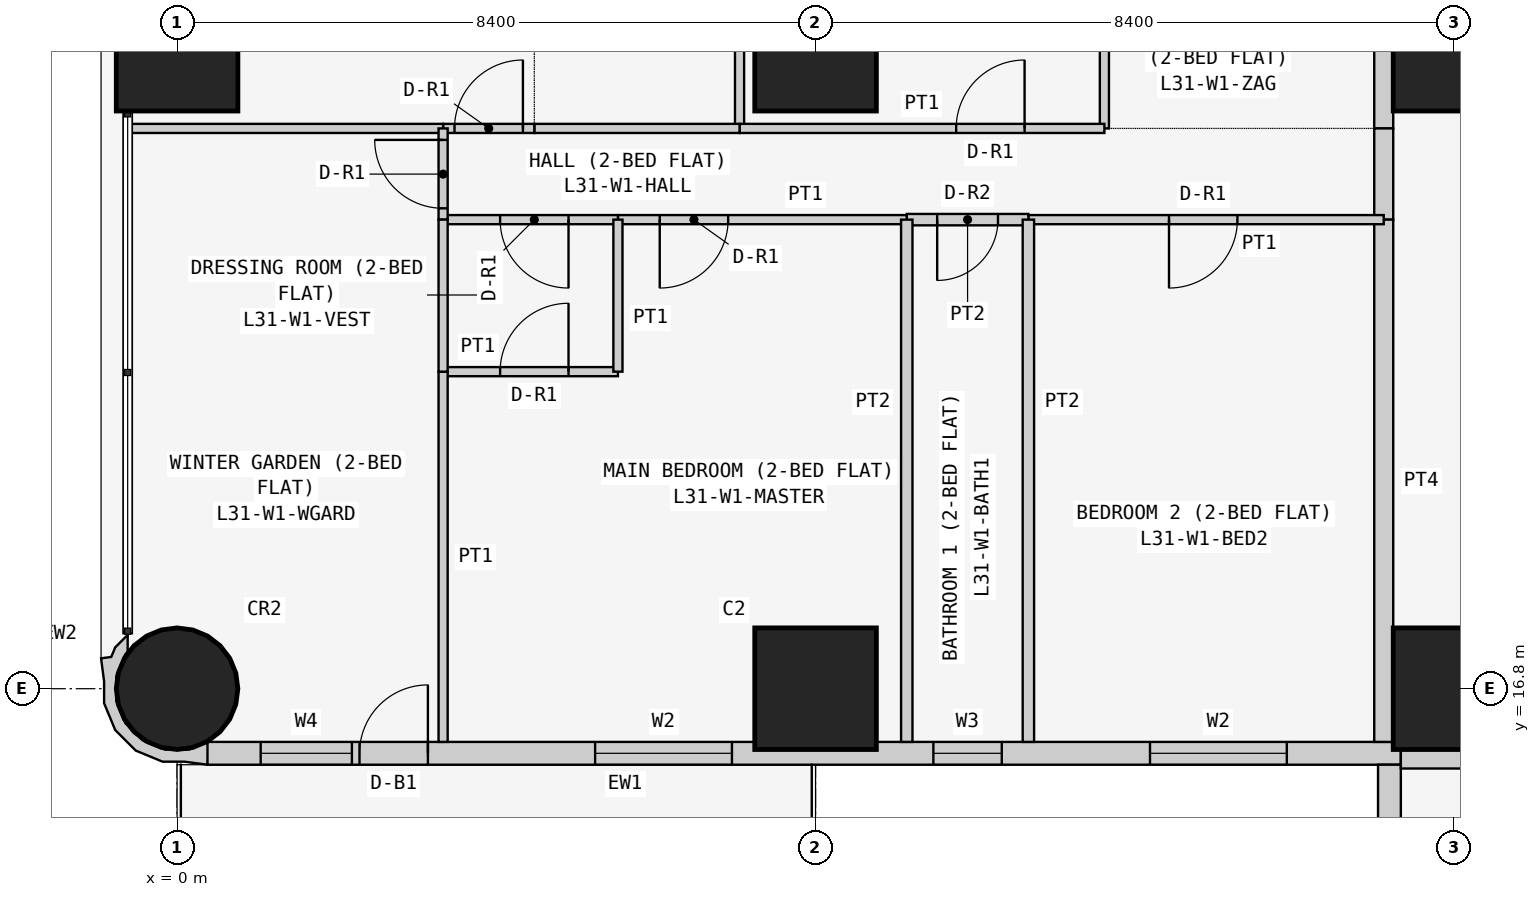
"""IFC4 building model, lengths in metres.
Left out: names, types, materials, properties, quantities, classifications, styles, units other than length and angle.
Written with IfcOpenShell. Run it as: python <this file> out.ifc"""

import sys

from ifc_helpers import new_model, si_unit, direction, frame, frame_2d, origin, origin_2d, place, context, subcontext, project, spatial, polyline, rectangle, circle, outline, extrude, element, fill, save


model = new_model("IFC4")
c1 = context("Model", 3, precision=1e-05, world=origin(), true_north=direction((0.0, 1.0)))
c2 = subcontext(c1, "Body", "Model", "MODEL_VIEW")
j1 = project(units=[si_unit("LENGTHUNIT", "METRE"), si_unit("PLANEANGLEUNIT", "RADIAN")], contexts=[c1])
p1 = place(None, origin())
s1 = spatial("IfcSite", under=j1, at=p1, CompositionType="ELEMENT")
p2 = place(p1, origin())
s2 = spatial("IfcBuilding", under=s1, at=p2, CompositionType="ELEMENT")
p3 = place(p2, frame((0.0, 0.0, 123.3)))
s3 = spatial("IfcBuildingStorey", under=s2, at=p3, CompositionType="ELEMENT", Elevation=123.3)
p4 = place(p3, frame((0.0, 16.8, 0.0), z_axis=(0.0, 0.0, 1.0), x_axis=(1.0, 0.0, 0.0)))
e1 = element("IfcColumn", 1, at=p4, inside=s3, PredefinedType="COLUMN", context=c2, shape_type="SweptSolid", body=[
    extrude(circle(Radius=0.8, at=origin_2d()), origin(), (0.0, 0.0, 1.0), 3.6),
])
for number, where, z_axis, x_axis in (
    (2, (0.0, 25.2, 0.0), (0.0, 0.0, 1.0), (1.0, 0.0, 0.0)),
    (3, (8.4, 16.8, 0.0), (0.0, 0.0, 1.0), (1.0, 0.0, 0.0)),
    (4, (8.4, 25.2, 0.0), (0.0, 0.0, 1.0), (1.0, 0.0, 0.0)),
    (5, (16.8, 16.8, 0.0), (0.0, 0.0, 1.0), (1.0, 0.0, 0.0)),
    (6, (16.8, 25.2, 0.0), (0.0, 0.0, 1.0), (1.0, 0.0, 0.0)),
):
    element("IfcColumn", number, at=place(p3, frame(where, z_axis=z_axis, x_axis=x_axis)), inside=s3, PredefinedType="COLUMN", context=c2, shape_type="SweptSolid", body=[
        extrude(rectangle(XDim=1.6, YDim=1.6, at=origin_2d()), origin(), (0.0, 0.0, 1.0), 3.6),
    ])
p5 = place(p3, frame((0.4, 15.95, 0.0), z_axis=(0.0, 0.0, 1.0), x_axis=(1.0, 0.0, 0.0)))
e7 = element("IfcWall", 7, at=p5, inside=s3, PredefinedType="SOLIDWALL", context=c2, shape_type="SweptSolid", body=[
    extrude(rectangle(XDim=15.7, YDim=0.3, at=frame_2d((7.85, 0.0))), origin(), (0.0, 0.0, 1.0), 3.45),
])
p6 = place(p5, frame((12.4, 0.0, 0.9)))
e8 = element("IfcOpeningElement", 8, at=p6, cuts=e7, PredefinedType="OPENING", context=c2, shape_type="SweptSolid", body=[
    extrude(rectangle(XDim=1.8, YDim=1.5, at=frame_2d((0.9, 0.75))), frame((0.0, 0.16, 0.0), z_axis=(0.0, -1.0, 0.0), x_axis=(1.0, 0.0, 0.0)), (0.0, 0.0, 1.0), 0.32),
])
p7 = place(p5, frame((9.55, 0.0, 1.5)))
e9 = element("IfcOpeningElement", 9, at=p7, cuts=e7, PredefinedType="OPENING", context=c2, shape_type="SweptSolid", body=[
    extrude(rectangle(XDim=0.9, YDim=0.7, at=frame_2d((0.45, 0.35))), frame((0.0, 0.16, 0.0), z_axis=(0.0, -1.0, 0.0), x_axis=(1.0, 0.0, 0.0)), (0.0, 0.0, 1.0), 0.32),
])
p8 = place(p5, frame((5.1, 0.0, 0.9)))
e10 = element("IfcOpeningElement", 10, at=p8, cuts=e7, PredefinedType="OPENING", context=c2, shape_type="SweptSolid", body=[
    extrude(rectangle(XDim=1.8, YDim=1.5, at=frame_2d((0.9, 0.75))), frame((0.0, 0.16, 0.0), z_axis=(0.0, -1.0, 0.0), x_axis=(1.0, 0.0, 0.0)), (0.0, 0.0, 1.0), 0.32),
])
p9 = place(p5, frame((2.0, 0.0, 0.0)))
e11 = element("IfcOpeningElement", 11, at=p9, cuts=e7, PredefinedType="OPENING", context=c2, shape_type="SweptSolid", body=[
    extrude(rectangle(XDim=0.9, YDim=2.4, at=frame_2d((0.45, 1.2))), frame((0.0, 0.16, 0.0), z_axis=(0.0, -1.0, 0.0), x_axis=(1.0, 0.0, 0.0)), (0.0, 0.0, 1.0), 0.32),
])
p10 = place(p5, frame((0.7, 0.0, 0.9)))
e12 = element("IfcOpeningElement", 12, at=p10, cuts=e7, PredefinedType="OPENING", context=c2, shape_type="SweptSolid", body=[
    extrude(rectangle(XDim=1.2, YDim=1.5, at=frame_2d((0.6, 0.75))), frame((0.0, 0.16, 0.0), z_axis=(0.0, -1.0, 0.0), x_axis=(1.0, 0.0, 0.0)), (0.0, 0.0, 1.0), 0.32),
])
p11 = place(p3, frame((15.95, 15.8, 0.0), z_axis=(0.0, 0.0, 1.0), x_axis=(0.0, -1.0, 0.0)))
e13 = element("IfcWall", 13, at=p11, inside=s3, PredefinedType="SOLIDWALL", context=c2, shape_type="SweptSolid", body=[
    extrude(rectangle(XDim=7.0, YDim=0.3, at=frame_2d((3.5, 0.0))), origin(), (0.0, 0.0, 1.0), 3.45),
])
p12 = place(p11, frame((1.5, 0.0, 0.9)))
e14 = element("IfcOpeningElement", 14, at=p12, cuts=e13, PredefinedType="OPENING", context=c2, shape_type="SweptSolid", body=[
    extrude(rectangle(XDim=2.4, YDim=1.5, at=frame_2d((1.2, 0.75))), frame((0.0, 0.16, 0.0), z_axis=(0.0, -1.0, 0.0), x_axis=(1.0, 0.0, 0.0)), (0.0, 0.0, 1.0), 0.32),
])
p13 = place(p11, frame((5.05, 0.0, 0.9)))
e15 = element("IfcOpeningElement", 15, at=p13, cuts=e13, PredefinedType="OPENING", context=c2, shape_type="SweptSolid", body=[
    extrude(rectangle(XDim=1.2, YDim=1.5, at=frame_2d((0.6, 0.75))), frame((0.0, 0.16, 0.0), z_axis=(0.0, -1.0, 0.0), x_axis=(1.0, 0.0, 0.0)), (0.0, 0.0, 1.0), 0.32),
])
p14 = place(p3, frame((-0.595, 17.448, 0.0), z_axis=(0.0, 0.0, 1.0), x_axis=(-0.93923434088, -0.343276641956, 0.0)))
e16 = element("IfcWall", 16, at=p14, inside=s3, PredefinedType="SOLIDWALL", context=c2, shape_type="SweptSolid", body=[
    extrude(outline(polyline([(-0.369, 1.89), (-0.509, 1.621), (-0.491, 1.614), (-0.479, 1.609), (-0.211, 1.62), (0.088, 1.511), (0.323, 1.295), (0.457, 1.006), (0.47, 0.688), (0.361, 0.389), (0.146, 0.154), (0.108, 0.137), (0.031, -0.075), (0.241, 0.023), (0.334, 0.124), (0.465, 0.094), (0.532, 0.393), (0.631, 0.663), (0.614, 1.045), (0.453, 1.391), (0.172, 1.649), (-0.098, 1.748), (-0.369, 1.89)])), origin(), (0.0, 0.0, 1.0), 3.45),
])
p15 = place(p3, frame((22.971, 15.875, 0.0), z_axis=(0.0, 0.0, 1.0), x_axis=(-1.0, 0.0, 0.0)))
e17 = element("IfcWall", 17, at=p15, inside=s3, PredefinedType="PARTITIONING", context=c2, shape_type="SweptSolid", body=[
    extrude(rectangle(XDim=6.871, YDim=0.25, at=frame_2d((3.436, 0.0))), origin(), (0.0, 0.0, 1.0), 3.45),
])
p16 = place(p3, frame((15.875, 24.171, 0.0), z_axis=(0.0, 0.0, 1.0), x_axis=(0.0, 1.0, 0.0)))
e18 = element("IfcWall", 18, at=p16, inside=s3, PredefinedType="PARTITIONING", context=c2, shape_type="SweptSolid", body=[
    extrude(rectangle(XDim=5.229, YDim=0.25, at=frame_2d((2.615, 0.0))), origin(), (0.0, 0.0, 1.0), 3.45),
])
p17 = place(p16, frame((2.129, 0.0, 0.0)))
e19 = element("IfcOpeningElement", 19, at=p17, cuts=e18, PredefinedType="OPENING", context=c2, shape_type="SweptSolid", body=[
    extrude(rectangle(XDim=1.0, YDim=2.1, at=frame_2d((0.5, 1.05))), frame((0.0, 0.135, 0.0), z_axis=(0.0, -1.0, 0.0), x_axis=(1.0, 0.0, 0.0)), (0.0, 0.0, 1.0), 0.27),
])
p18 = place(p3, frame((15.875, 22.971, 0.0), z_axis=(0.0, 0.0, 1.0), x_axis=(0.0, 1.0, 0.0)))
e20 = element("IfcWall", 20, at=p18, inside=s3, PredefinedType="PARTITIONING", context=c2, shape_type="SweptSolid", body=[
    extrude(rectangle(XDim=1.2, YDim=0.25, at=frame_2d((0.6, 0.0))), origin(), (0.0, 0.0, 1.0), 3.45),
])
p19 = place(p3, frame((15.875, 16.1, 0.0), z_axis=(0.0, 0.0, 1.0), x_axis=(0.0, 1.0, 0.0)))
e21 = element("IfcWall", 21, at=p19, inside=s3, PredefinedType="PARTITIONING", context=c2, shape_type="SweptSolid", body=[
    extrude(rectangle(XDim=6.871, YDim=0.25, at=frame_2d((3.436, 0.0))), origin(), (0.0, 0.0, 1.0), 3.45),
])
for number, where, z_axis, x_axis in (
    (22, (12.2, 29.4, 0.0), (0.0, 0.0, 1.0), (0.0, -1.0, 0.0)),
    (23, (7.4, 29.4, 0.0), (0.0, 0.0, 1.0), (0.0, -1.0, 0.0)),
):
    element("IfcWall", number, at=place(p3, frame(where, z_axis=z_axis, x_axis=x_axis)), inside=s3, PredefinedType="PARTITIONING", context=c2, shape_type="SweptSolid", body=[
        extrude(rectangle(XDim=5.229, YDim=0.12, at=frame_2d((2.615, 0.0))), origin(), (0.0, 0.0, 1.0), 3.45),
    ])
p20 = place(p3, frame((7.4, 24.171, 0.0), z_axis=(0.0, 0.0, 1.0), x_axis=(1.0, 0.0, 0.0)))
e24 = element("IfcWall", 24, at=p20, inside=s3, PredefinedType="PARTITIONING", context=c2, shape_type="SweptSolid", body=[
    extrude(rectangle(XDim=4.8, YDim=0.12, at=frame_2d((2.4, 0.0))), origin(), (0.0, 0.0, 1.0), 3.45),
])
p21 = place(p20, frame((2.85, 0.0, 0.0)))
e25 = element("IfcOpeningElement", 25, at=p21, cuts=e24, PredefinedType="OPENING", context=c2, shape_type="SweptSolid", body=[
    extrude(rectangle(XDim=0.9, YDim=2.1, at=frame_2d((0.45, 1.05))), frame((0.0, 0.07, 0.0), z_axis=(0.0, -1.0, 0.0), x_axis=(1.0, 0.0, 0.0)), (0.0, 0.0, 1.0), 0.14),
])
p22 = place(p3, frame((4.7, 24.171, 0.0), z_axis=(0.0, 0.0, 1.0), x_axis=(1.0, 0.0, 0.0)))
e26 = element("IfcWall", 26, at=p22, inside=s3, PredefinedType="PARTITIONING", context=c2, shape_type="SweptSolid", body=[
    extrude(rectangle(XDim=2.7, YDim=0.12, at=frame_2d((1.35, 0.0))), origin(), (0.0, 0.0, 1.0), 3.45),
])
p23 = place(p3, frame((3.5, 24.171, 0.0), z_axis=(0.0, 0.0, 1.0), x_axis=(1.0, 0.0, 0.0)))
e27 = element("IfcWall", 27, at=p23, inside=s3, PredefinedType="PARTITIONING", context=c2, shape_type="SweptSolid", body=[
    extrude(rectangle(XDim=1.2, YDim=0.12, at=frame_2d((0.6, 0.0))), origin(), (0.0, 0.0, 1.0), 3.45),
])
p24 = place(p23, frame((0.15, 0.0, 0.0)))
e28 = element("IfcOpeningElement", 28, at=p24, cuts=e27, PredefinedType="OPENING", context=c2, shape_type="SweptSolid", body=[
    extrude(rectangle(XDim=0.9, YDim=2.1, at=frame_2d((0.45, 1.05))), frame((0.0, 0.07, 0.0), z_axis=(0.0, -1.0, 0.0), x_axis=(1.0, 0.0, 0.0)), (0.0, 0.0, 1.0), 0.14),
])
p25 = place(p3, frame((-0.65, 24.171, 0.0), z_axis=(0.0, 0.0, 1.0), x_axis=(1.0, 0.0, 0.0)))
e29 = element("IfcWall", 29, at=p25, inside=s3, PredefinedType="PARTITIONING", context=c2, shape_type="SweptSolid", body=[
    extrude(rectangle(XDim=4.15, YDim=0.12, at=frame_2d((2.075, 0.0))), origin(), (0.0, 0.0, 1.0), 3.45),
])
p26 = place(p3, frame((11.2, 22.971, 0.0), z_axis=(0.0, 0.0, 1.0), x_axis=(1.0, 0.0, 0.0)))
e30 = element("IfcWall", 30, at=p26, inside=s3, PredefinedType="PARTITIONING", context=c2, shape_type="SweptSolid", body=[
    extrude(rectangle(XDim=4.675, YDim=0.12, at=frame_2d((2.337, 0.0))), origin(), (0.0, 0.0, 1.0), 3.45),
])
p27 = place(p26, frame((1.85, 0.0, 0.0)))
e31 = element("IfcOpeningElement", 31, at=p27, cuts=e30, PredefinedType="OPENING", context=c2, shape_type="SweptSolid", body=[
    extrude(rectangle(XDim=0.9, YDim=2.1, at=frame_2d((0.45, 1.05))), frame((0.0, 0.07, 0.0), z_axis=(0.0, -1.0, 0.0), x_axis=(1.0, 0.0, 0.0)), (0.0, 0.0, 1.0), 0.14),
])
p28 = place(p3, frame((9.6, 22.971, 0.0), z_axis=(0.0, 0.0, 1.0), x_axis=(1.0, 0.0, 0.0)))
e32 = element("IfcWall", 32, at=p28, inside=s3, PredefinedType="PARTITIONING", context=c2, shape_type="SweptSolid", body=[
    extrude(rectangle(XDim=1.6, YDim=0.15, at=frame_2d((0.8, 0.0))), origin(), (0.0, 0.0, 1.0), 3.45),
])
p29 = place(p28, frame((0.4, 0.0, 0.0)))
e33 = element("IfcOpeningElement", 33, at=p29, cuts=e32, PredefinedType="OPENING", context=c2, shape_type="SweptSolid", body=[
    extrude(rectangle(XDim=0.8, YDim=2.1, at=frame_2d((0.4, 1.05))), frame((0.0, 0.085, 0.0), z_axis=(0.0, -1.0, 0.0), x_axis=(1.0, 0.0, 0.0)), (0.0, 0.0, 1.0), 0.17),
])
p30 = place(p3, frame((5.8, 22.971, 0.0), z_axis=(0.0, 0.0, 1.0), x_axis=(1.0, 0.0, 0.0)))
e34 = element("IfcWall", 34, at=p30, inside=s3, PredefinedType="PARTITIONING", context=c2, shape_type="SweptSolid", body=[
    extrude(rectangle(XDim=3.8, YDim=0.12, at=frame_2d((1.9, 0.0))), origin(), (0.0, 0.0, 1.0), 3.45),
])
p31 = place(p30, frame((0.55, 0.0, 0.0)))
e35 = element("IfcOpeningElement", 35, at=p31, cuts=e34, PredefinedType="OPENING", context=c2, shape_type="SweptSolid", body=[
    extrude(rectangle(XDim=0.9, YDim=2.1, at=frame_2d((0.45, 1.05))), frame((0.0, 0.07, 0.0), z_axis=(0.0, -1.0, 0.0), x_axis=(1.0, 0.0, 0.0)), (0.0, 0.0, 1.0), 0.14),
])
p32 = place(p3, frame((3.5, 22.971, 0.0), z_axis=(0.0, 0.0, 1.0), x_axis=(1.0, 0.0, 0.0)))
e36 = element("IfcWall", 36, at=p32, inside=s3, PredefinedType="PARTITIONING", context=c2, shape_type="SweptSolid", body=[
    extrude(rectangle(XDim=2.3, YDim=0.12, at=frame_2d((1.15, 0.0))), origin(), (0.0, 0.0, 1.0), 3.45),
])
p33 = place(p32, frame((0.75, 0.0, 0.0)))
e37 = element("IfcOpeningElement", 37, at=p33, cuts=e36, PredefinedType="OPENING", context=c2, shape_type="SweptSolid", body=[
    extrude(rectangle(XDim=0.9, YDim=2.1, at=frame_2d((0.45, 1.05))), frame((0.0, 0.07, 0.0), z_axis=(0.0, -1.0, 0.0), x_axis=(1.0, 0.0, 0.0)), (0.0, 0.0, 1.0), 0.14),
])
p34 = place(p3, frame((3.5, 24.171, 0.0), z_axis=(0.0, 0.0, 1.0), x_axis=(0.0, -1.0, 0.0)))
e38 = element("IfcWall", 38, at=p34, inside=s3, PredefinedType="PARTITIONING", context=c2, shape_type="SweptSolid", body=[
    extrude(rectangle(XDim=1.2, YDim=0.12, at=frame_2d((0.6, 0.0))), origin(), (0.0, 0.0, 1.0), 3.45),
])
p35 = place(p34, frame((0.151, 0.0, 0.0)))
e39 = element("IfcOpeningElement", 39, at=p35, cuts=e38, PredefinedType="OPENING", context=c2, shape_type="SweptSolid", body=[
    extrude(rectangle(XDim=0.9, YDim=2.1, at=frame_2d((0.45, 1.05))), frame((0.0, 0.07, 0.0), z_axis=(0.0, -1.0, 0.0), x_axis=(1.0, 0.0, 0.0)), (0.0, 0.0, 1.0), 0.14),
])
for number, where, z_axis, x_axis in (
    (40, (11.2, 22.971, 0.0), (0.0, 0.0, 1.0), (0.0, -1.0, 0.0)),
    (41, (9.6, 22.971, 0.0), (0.0, 0.0, 1.0), (0.0, -1.0, 0.0)),
):
    element("IfcWall", number, at=place(p3, frame(where, z_axis=z_axis, x_axis=x_axis)), inside=s3, PredefinedType="PARTITIONING", context=c2, shape_type="SweptSolid", body=[
        extrude(rectangle(XDim=6.871, YDim=0.15, at=frame_2d((3.436, 0.0))), origin(), (0.0, 0.0, 1.0), 3.45),
    ])
p36 = place(p3, frame((3.5, 20.971, 0.0), z_axis=(0.0, 0.0, 1.0), x_axis=(1.0, 0.0, 0.0)))
e42 = element("IfcWall", 42, at=p36, inside=s3, PredefinedType="PARTITIONING", context=c2, shape_type="SweptSolid", body=[
    extrude(rectangle(XDim=2.3, YDim=0.12, at=frame_2d((1.15, 0.0))), origin(), (0.0, 0.0, 1.0), 3.45),
])
p37 = place(p36, frame((0.75, 0.0, 0.0)))
e43 = element("IfcOpeningElement", 43, at=p37, cuts=e42, PredefinedType="OPENING", context=c2, shape_type="SweptSolid", body=[
    extrude(rectangle(XDim=0.9, YDim=2.1, at=frame_2d((0.45, 1.05))), frame((0.0, 0.07, 0.0), z_axis=(0.0, -1.0, 0.0), x_axis=(1.0, 0.0, 0.0)), (0.0, 0.0, 1.0), 0.14),
])
p38 = place(p3, frame((5.8, 20.971, 0.0), z_axis=(0.0, 0.0, 1.0), x_axis=(0.0, 1.0, 0.0)))
e44 = element("IfcWall", 44, at=p38, inside=s3, PredefinedType="PARTITIONING", context=c2, shape_type="SweptSolid", body=[
    extrude(rectangle(XDim=2.0, YDim=0.12, at=frame_2d((1.0, 0.0))), origin(), (0.0, 0.0, 1.0), 3.45),
])
p39 = place(p3, frame((3.5, 16.1, 0.0), z_axis=(0.0, 0.0, 1.0), x_axis=(0.0, 1.0, 0.0)))
e45 = element("IfcWall", 45, at=p39, inside=s3, PredefinedType="PARTITIONING", context=c2, shape_type="SweptSolid", body=[
    extrude(rectangle(XDim=4.871, YDim=0.12, at=frame_2d((2.436, 0.0))), origin(), (0.0, 0.0, 1.0), 3.45),
])
p40 = place(p3, frame((3.5, 22.971, 0.0), z_axis=(0.0, 0.0, 1.0), x_axis=(0.0, -1.0, 0.0)))
e46 = element("IfcWall", 46, at=p40, inside=s3, PredefinedType="PARTITIONING", context=c2, shape_type="SweptSolid", body=[
    extrude(rectangle(XDim=2.0, YDim=0.12, at=frame_2d((1.0, 0.0))), origin(), (0.0, 0.0, 1.0), 3.45),
])
p41 = place(p6, origin())
e47 = element("IfcWindow", 47, at=p41, inside=s3, PartitioningType="SINGLE_PANEL", PredefinedType="WINDOW", context=c2, shape_type="SweptSolid", body=[
    extrude(rectangle(XDim=1.8, YDim=1.5, at=frame_2d((0.9, 0.75))), frame((0.0, 0.03, 0.0), z_axis=(0.0, -1.0, 0.0), x_axis=(1.0, 0.0, 0.0)), (0.0, 0.0, 1.0), 0.06),
])
fill(e8, e47)
p42 = place(p7, origin())
e48 = element("IfcWindow", 48, at=p42, inside=s3, PartitioningType="SINGLE_PANEL", PredefinedType="WINDOW", context=c2, shape_type="SweptSolid", body=[
    extrude(rectangle(XDim=0.9, YDim=0.7, at=frame_2d((0.45, 0.35))), frame((0.0, 0.03, 0.0), z_axis=(0.0, -1.0, 0.0), x_axis=(1.0, 0.0, 0.0)), (0.0, 0.0, 1.0), 0.06),
])
fill(e9, e48)
p43 = place(p8, origin())
e49 = element("IfcWindow", 49, at=p43, inside=s3, PartitioningType="SINGLE_PANEL", PredefinedType="WINDOW", context=c2, shape_type="SweptSolid", body=[
    extrude(rectangle(XDim=1.8, YDim=1.5, at=frame_2d((0.9, 0.75))), frame((0.0, 0.03, 0.0), z_axis=(0.0, -1.0, 0.0), x_axis=(1.0, 0.0, 0.0)), (0.0, 0.0, 1.0), 0.06),
])
fill(e10, e49)
p44 = place(p9, origin())
e50 = element("IfcDoor", 50, at=p44, inside=s3, OperationType="SINGLE_SWING_RIGHT", PredefinedType="DOOR", context=c2, shape_type="SweptSolid", body=[
    extrude(rectangle(XDim=0.9, YDim=2.4, at=frame_2d((0.45, 1.2))), frame((0.0, 0.025, 0.0), z_axis=(0.0, -1.0, 0.0), x_axis=(1.0, 0.0, 0.0)), (0.0, 0.0, 1.0), 0.05),
])
fill(e11, e50)
p45 = place(p10, origin())
e51 = element("IfcWindow", 51, at=p45, inside=s3, PartitioningType="SINGLE_PANEL", PredefinedType="WINDOW", context=c2, shape_type="SweptSolid", body=[
    extrude(rectangle(XDim=1.2, YDim=1.5, at=frame_2d((0.6, 0.75))), frame((0.0, 0.03, 0.0), z_axis=(0.0, -1.0, 0.0), x_axis=(1.0, 0.0, 0.0)), (0.0, 0.0, 1.0), 0.06),
])
fill(e12, e51)
p46 = place(p21, origin())
e52 = element("IfcDoor", 52, at=p46, inside=s3, OperationType="SINGLE_SWING_RIGHT", PredefinedType="DOOR", context=c2, shape_type="SweptSolid", body=[
    extrude(rectangle(XDim=0.9, YDim=2.1, at=frame_2d((0.45, 1.05))), frame((0.0, 0.025, 0.0), z_axis=(0.0, -1.0, 0.0), x_axis=(1.0, 0.0, 0.0)), (0.0, 0.0, 1.0), 0.05),
])
fill(e25, e52)
p47 = place(p24, origin())
e53 = element("IfcDoor", 53, at=p47, inside=s3, OperationType="SINGLE_SWING_RIGHT", PredefinedType="DOOR", context=c2, shape_type="SweptSolid", body=[
    extrude(rectangle(XDim=0.9, YDim=2.1, at=frame_2d((0.45, 1.05))), frame((0.0, 0.025, 0.0), z_axis=(0.0, -1.0, 0.0), x_axis=(1.0, 0.0, 0.0)), (0.0, 0.0, 1.0), 0.05),
])
fill(e28, e53)
p48 = place(p27, frame((0.9, 0.0, 0.0), z_axis=(0.0, 0.0, 1.0), x_axis=(-1.0, 0.0, 0.0)))
e54 = element("IfcDoor", 54, at=p48, inside=s3, OperationType="SINGLE_SWING_RIGHT", PredefinedType="DOOR", context=c2, shape_type="SweptSolid", body=[
    extrude(rectangle(XDim=0.9, YDim=2.1, at=frame_2d((0.45, 1.05))), frame((0.0, 0.025, 0.0), z_axis=(0.0, -1.0, 0.0), x_axis=(1.0, 0.0, 0.0)), (0.0, 0.0, 1.0), 0.05),
])
fill(e31, e54)
p49 = place(p29, frame((0.8, 0.0, 0.0), z_axis=(0.0, 0.0, 1.0), x_axis=(-1.0, 0.0, 0.0)))
e55 = element("IfcDoor", 55, at=p49, inside=s3, OperationType="SINGLE_SWING_RIGHT", PredefinedType="DOOR", context=c2, shape_type="SweptSolid", body=[
    extrude(rectangle(XDim=0.8, YDim=2.1, at=frame_2d((0.4, 1.05))), frame((0.0, 0.025, 0.0), z_axis=(0.0, -1.0, 0.0), x_axis=(1.0, 0.0, 0.0)), (0.0, 0.0, 1.0), 0.05),
])
fill(e33, e55)
p50 = place(p31, frame((0.9, 0.0, 0.0), z_axis=(0.0, 0.0, 1.0), x_axis=(-1.0, 0.0, 0.0)))
e56 = element("IfcDoor", 56, at=p50, inside=s3, OperationType="SINGLE_SWING_RIGHT", PredefinedType="DOOR", context=c2, shape_type="SweptSolid", body=[
    extrude(rectangle(XDim=0.9, YDim=2.1, at=frame_2d((0.45, 1.05))), frame((0.0, 0.025, 0.0), z_axis=(0.0, -1.0, 0.0), x_axis=(1.0, 0.0, 0.0)), (0.0, 0.0, 1.0), 0.05),
])
fill(e35, e56)
p51 = place(p33, frame((0.9, 0.0, 0.0), z_axis=(0.0, 0.0, 1.0), x_axis=(-1.0, 0.0, 0.0)))
e57 = element("IfcDoor", 57, at=p51, inside=s3, OperationType="SINGLE_SWING_LEFT", PredefinedType="DOOR", context=c2, shape_type="SweptSolid", body=[
    extrude(rectangle(XDim=0.9, YDim=2.1, at=frame_2d((0.45, 1.05))), frame((0.0, 0.025, 0.0), z_axis=(0.0, -1.0, 0.0), x_axis=(1.0, 0.0, 0.0)), (0.0, 0.0, 1.0), 0.05),
])
fill(e37, e57)
p52 = place(p37, origin())
e58 = element("IfcDoor", 58, at=p52, inside=s3, OperationType="SINGLE_SWING_RIGHT", PredefinedType="DOOR", context=c2, shape_type="SweptSolid", body=[
    extrude(rectangle(XDim=0.9, YDim=2.1, at=frame_2d((0.45, 1.05))), frame((0.0, 0.025, 0.0), z_axis=(0.0, -1.0, 0.0), x_axis=(1.0, 0.0, 0.0)), (0.0, 0.0, 1.0), 0.05),
])
fill(e43, e58)
p53 = place(p35, frame((0.9, 0.0, 0.0), z_axis=(0.0, 0.0, 1.0), x_axis=(-1.0, 0.0, 0.0)))
e59 = element("IfcDoor", 59, at=p53, inside=s3, OperationType="SINGLE_SWING_RIGHT", PredefinedType="DOOR", context=c2, shape_type="SweptSolid", body=[
    extrude(rectangle(XDim=0.9, YDim=2.1, at=frame_2d((0.45, 1.05))), frame((0.0, 0.025, 0.0), z_axis=(0.0, -1.0, 0.0), x_axis=(1.0, 0.0, 0.0)), (0.0, 0.0, 1.0), 0.05),
])
fill(e39, e59)
save(model, sys.argv[1])
